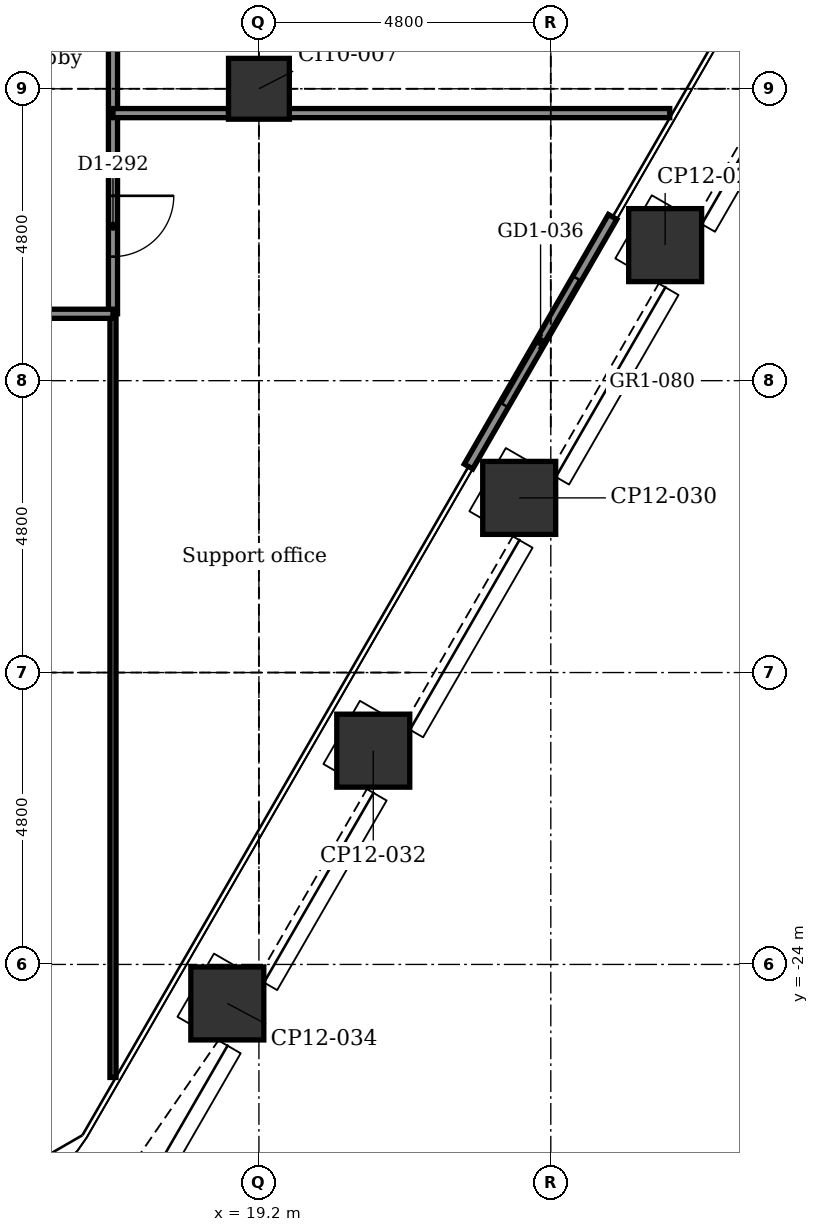
"""IFC4 building model, lengths in metres.
Left out: names, types, materials, properties, quantities, classifications, styles, units other than length and angle.
Written with IfcOpenShell. Run it as: python <this file> out.ifc"""

import sys

from ifc_helpers import new_model, si_unit, direction, frame, frame_2d, origin, origin_2d, place, context, subcontext, project, spatial, rectangle, extrude, element, fill, save


model = new_model("IFC4")
c1 = context("Model", 3, precision=1e-05, world=origin(), true_north=direction((0.0, 1.0)))
c2 = subcontext(c1, "Body", "Model", "MODEL_VIEW")
j1 = project(units=[si_unit("LENGTHUNIT", "METRE"), si_unit("PLANEANGLEUNIT", "RADIAN")], contexts=[c1])
p1 = place(None, origin())
s1 = spatial("IfcSite", under=j1, at=p1, CompositionType="ELEMENT")
p2 = place(p1, origin())
s2 = spatial("IfcBuilding", under=s1, at=p2, CompositionType="ELEMENT")
p3 = place(p2, frame((0.0, 0.0, 109.4)))
s3 = spatial("IfcBuildingStorey", under=s2, at=p3, CompositionType="ELEMENT", Elevation=109.4)
for number, where, z_axis, x_axis in (
    (1, (25.88, -12.171, -0.2), (0.0, 0.0, 1.0), (0.5, 0.866, 0.0)),
    (2, (23.48, -16.328, -0.2), (0.0, 0.0, 1.0), (0.5, 0.866, 0.0)),
    (3, (21.08, -20.485, -0.2), (0.0, 0.0, 1.0), (0.5, 0.866, 0.0)),
    (4, (18.68, -24.642, -0.2), (0.0, 0.0, 1.0), (0.5, 0.866, 0.0)),
):
    element("IfcColumn", number, at=place(p3, frame(where, z_axis=z_axis, x_axis=x_axis)), inside=s3, PredefinedType="COLUMN", context=c2, shape_type="SweptSolid", body=[
        extrude(rectangle(XDim=1.2, YDim=1.2, at=origin_2d()), origin(), (0.0, 0.0, 1.0), 4.5),
    ])
p4 = place(p3, frame((19.2, -9.6, -0.2), z_axis=(0.0, 0.0, 1.0), x_axis=(1.0, 0.0, 0.0)))
e5 = element("IfcColumn", 5, at=p4, inside=s3, PredefinedType="COLUMN", context=c2, shape_type="SweptSolid", body=[
    extrude(rectangle(XDim=1.0, YDim=1.0, at=origin_2d()), origin(), (0.0, 0.0, 1.0), 4.5),
])
p5 = place(p3, frame((25.017, -11.707, 0.0), z_axis=(0.0, 0.0, 1.0), x_axis=(-0.499978080042, -0.866038058908, 0.0)))
e6 = element("IfcWall", 6, at=p5, inside=s3, PredefinedType="PARTITIONING", context=c2, shape_type="SweptSolid", body=[
    extrude(rectangle(XDim=4.74, YDim=0.16, at=frame_2d((2.37, 0.0))), origin(), (0.0, 0.0, 1.0), 4.3),
])
p6 = place(p5, frame((1.17, 0.0, 0.0)))
e7 = element("IfcOpeningElement", 7, at=p6, cuts=e6, PredefinedType="OPENING", context=c2, shape_type="SweptSolid", body=[
    extrude(rectangle(XDim=2.4, YDim=2.4, at=frame_2d((1.2, 1.2))), frame((0.0, 0.09, 0.0), z_axis=(0.0, -1.0, 0.0), x_axis=(1.0, 0.0, 0.0)), (0.0, 0.0, 1.0), 0.18),
])
p7 = place(p3, frame((16.8, -25.858, 0.0), z_axis=(0.0, 0.0, 1.0), x_axis=(0.0, 1.0, 0.0)))
e8 = element("IfcWall", 8, at=p7, inside=s3, PredefinedType="PARTITIONING", context=c2, shape_type="SweptSolid", body=[
    extrude(rectangle(XDim=12.558, YDim=0.1, at=frame_2d((6.279, 0.0))), origin(), (0.0, 0.0, 1.0), 4.3),
])
p8 = place(p3, frame((16.8, -13.3, 0.0), z_axis=(0.0, 0.0, 1.0), x_axis=(0.0, 1.0, 0.0)))
e9 = element("IfcWall", 9, at=p8, inside=s3, PredefinedType="PARTITIONING", context=c2, shape_type="SweptSolid", body=[
    extrude(rectangle(XDim=9.35, YDim=0.15, at=frame_2d((4.675, 0.0))), origin(), (0.0, 0.0, 1.0), 4.3),
])
p9 = place(p8, frame((0.94, 0.0, 0.0)))
e10 = element("IfcOpeningElement", 10, at=p9, cuts=e9, PredefinedType="OPENING", context=c2, shape_type="SweptSolid", body=[
    extrude(rectangle(XDim=1.0, YDim=2.1, at=frame_2d((0.5, 1.05))), frame((0.0, 0.085, 0.0), z_axis=(0.0, -1.0, 0.0), x_axis=(1.0, 0.0, 0.0)), (0.0, 0.0, 1.0), 0.17),
])
p10 = place(p8, frame((6.1, 0.0, 0.0)))
e11 = element("IfcOpeningElement", 11, at=p10, cuts=e9, PredefinedType="OPENING", context=c2, shape_type="SweptSolid", body=[
    extrude(rectangle(XDim=1.0, YDim=2.1, at=frame_2d((0.5, 1.05))), frame((0.0, 0.085, 0.0), z_axis=(0.0, -1.0, 0.0), x_axis=(1.0, 0.0, 0.0)), (0.0, 0.0, 1.0), 0.17),
])
p11 = place(p3, frame((-16.8, -13.3, 0.0), z_axis=(0.0, 0.0, 1.0), x_axis=(1.0, 0.0, 0.0)))
e12 = element("IfcWall", 12, at=p11, inside=s3, PredefinedType="PARTITIONING", context=c2, shape_type="SweptSolid", body=[
    extrude(rectangle(XDim=33.6, YDim=0.15, at=frame_2d((16.8, 0.0))), origin(), (0.0, 0.0, 1.0), 4.3),
])
p12 = place(p11, frame((8.55, 0.0, 0.0)))
e13 = element("IfcOpeningElement", 13, at=p12, cuts=e12, PredefinedType="OPENING", context=c2, shape_type="SweptSolid", body=[
    extrude(rectangle(XDim=0.9, YDim=2.1, at=frame_2d((0.45, 1.05))), frame((0.0, 0.085, 0.0), z_axis=(0.0, -1.0, 0.0), x_axis=(1.0, 0.0, 0.0)), (0.0, 0.0, 1.0), 0.17),
])
p13 = place(p11, frame((11.55, 0.0, 0.0)))
e14 = element("IfcOpeningElement", 14, at=p13, cuts=e12, PredefinedType="OPENING", context=c2, shape_type="SweptSolid", body=[
    extrude(rectangle(XDim=0.9, YDim=2.1, at=frame_2d((0.45, 1.05))), frame((0.0, 0.085, 0.0), z_axis=(0.0, -1.0, 0.0), x_axis=(1.0, 0.0, 0.0)), (0.0, 0.0, 1.0), 0.17),
])
p14 = place(p11, frame((4.955, 0.0, 0.0)))
e15 = element("IfcOpeningElement", 15, at=p14, cuts=e12, PredefinedType="OPENING", context=c2, shape_type="SweptSolid", body=[
    extrude(rectangle(XDim=1.0, YDim=2.1, at=frame_2d((0.5, 1.05))), frame((0.0, 0.085, 0.0), z_axis=(0.0, -1.0, 0.0), x_axis=(1.0, 0.0, 0.0)), (0.0, 0.0, 1.0), 0.17),
])
p15 = place(p11, frame((15.025, 0.0, 0.0)))
e16 = element("IfcOpeningElement", 16, at=p15, cuts=e12, PredefinedType="OPENING", context=c2, shape_type="SweptSolid", body=[
    extrude(rectangle(XDim=1.0, YDim=2.1, at=frame_2d((0.5, 1.05))), frame((0.0, 0.085, 0.0), z_axis=(0.0, -1.0, 0.0), x_axis=(1.0, 0.0, 0.0)), (0.0, 0.0, 1.0), 0.17),
])
p16 = place(p11, frame((23.5, 0.0, 0.0)))
e17 = element("IfcOpeningElement", 17, at=p16, cuts=e12, PredefinedType="OPENING", context=c2, shape_type="SweptSolid", body=[
    extrude(rectangle(XDim=1.0, YDim=2.1, at=frame_2d((0.5, 1.05))), frame((0.0, 0.085, 0.0), z_axis=(0.0, -1.0, 0.0), x_axis=(1.0, 0.0, 0.0)), (0.0, 0.0, 1.0), 0.17),
])
p17 = place(p11, frame((27.645, 0.0, 0.0)))
e18 = element("IfcOpeningElement", 18, at=p17, cuts=e12, PredefinedType="OPENING", context=c2, shape_type="SweptSolid", body=[
    extrude(rectangle(XDim=1.0, YDim=2.1, at=frame_2d((0.5, 1.05))), frame((0.0, 0.085, 0.0), z_axis=(0.0, -1.0, 0.0), x_axis=(1.0, 0.0, 0.0)), (0.0, 0.0, 1.0), 0.17),
])
p18 = place(p11, frame((19.135, 0.0, 0.0)))
e19 = element("IfcOpeningElement", 19, at=p18, cuts=e12, PredefinedType="OPENING", context=c2, shape_type="SweptSolid", body=[
    extrude(rectangle(XDim=1.0, YDim=2.1, at=frame_2d((0.5, 1.05))), frame((0.0, 0.085, 0.0), z_axis=(0.0, -1.0, 0.0), x_axis=(1.0, 0.0, 0.0)), (0.0, 0.0, 1.0), 0.17),
])
p19 = place(p3, frame((16.8, -10.0, 0.0), z_axis=(0.0, 0.0, 1.0), x_axis=(1.0, 0.0, 0.0)))
e20 = element("IfcWall", 20, at=p19, inside=s3, PredefinedType="PARTITIONING", context=c2, shape_type="SweptSolid", body=[
    extrude(rectangle(XDim=1.9, YDim=0.15, at=frame_2d((0.95, 0.0))), origin(), (0.0, 0.0, 1.0), 4.3),
])
p20 = place(p3, frame((19.7, -10.0, 0.0), z_axis=(0.0, 0.0, 1.0), x_axis=(1.0, 0.0, 0.0)))
e21 = element("IfcWall", 21, at=p20, inside=s3, PredefinedType="PARTITIONING", context=c2, shape_type="SweptSolid", body=[
    extrude(rectangle(XDim=6.256, YDim=0.15, at=frame_2d((3.128, 0.0))), origin(), (0.0, 0.0, 1.0), 4.3),
])
p21 = place(p6, origin())
e22 = element("IfcDoor", 22, at=p21, inside=s3, OperationType="DOUBLE_DOOR_SLIDING", PredefinedType="DOOR", context=c2, shape_type="SweptSolid", body=[
    extrude(rectangle(XDim=2.4, YDim=2.4, at=frame_2d((1.2, 1.2))), frame((0.0, 0.025, 0.0), z_axis=(0.0, -1.0, 0.0), x_axis=(1.0, 0.0, 0.0)), (0.0, 0.0, 1.0), 0.05),
])
fill(e7, e22)
p22 = place(p9, frame((1.0, 0.0, 0.0), z_axis=(0.0, 0.0, 1.0), x_axis=(-1.0, 0.0, 0.0)))
e23 = element("IfcDoor", 23, at=p22, inside=s3, OperationType="SINGLE_SWING_RIGHT", PredefinedType="DOOR", context=c2, shape_type="SweptSolid", body=[
    extrude(rectangle(XDim=1.0, YDim=2.1, at=frame_2d((0.5, 1.05))), frame((0.0, 0.025, 0.0), z_axis=(0.0, -1.0, 0.0), x_axis=(1.0, 0.0, 0.0)), (0.0, 0.0, 1.0), 0.05),
])
fill(e10, e23)
save(model, sys.argv[1])
